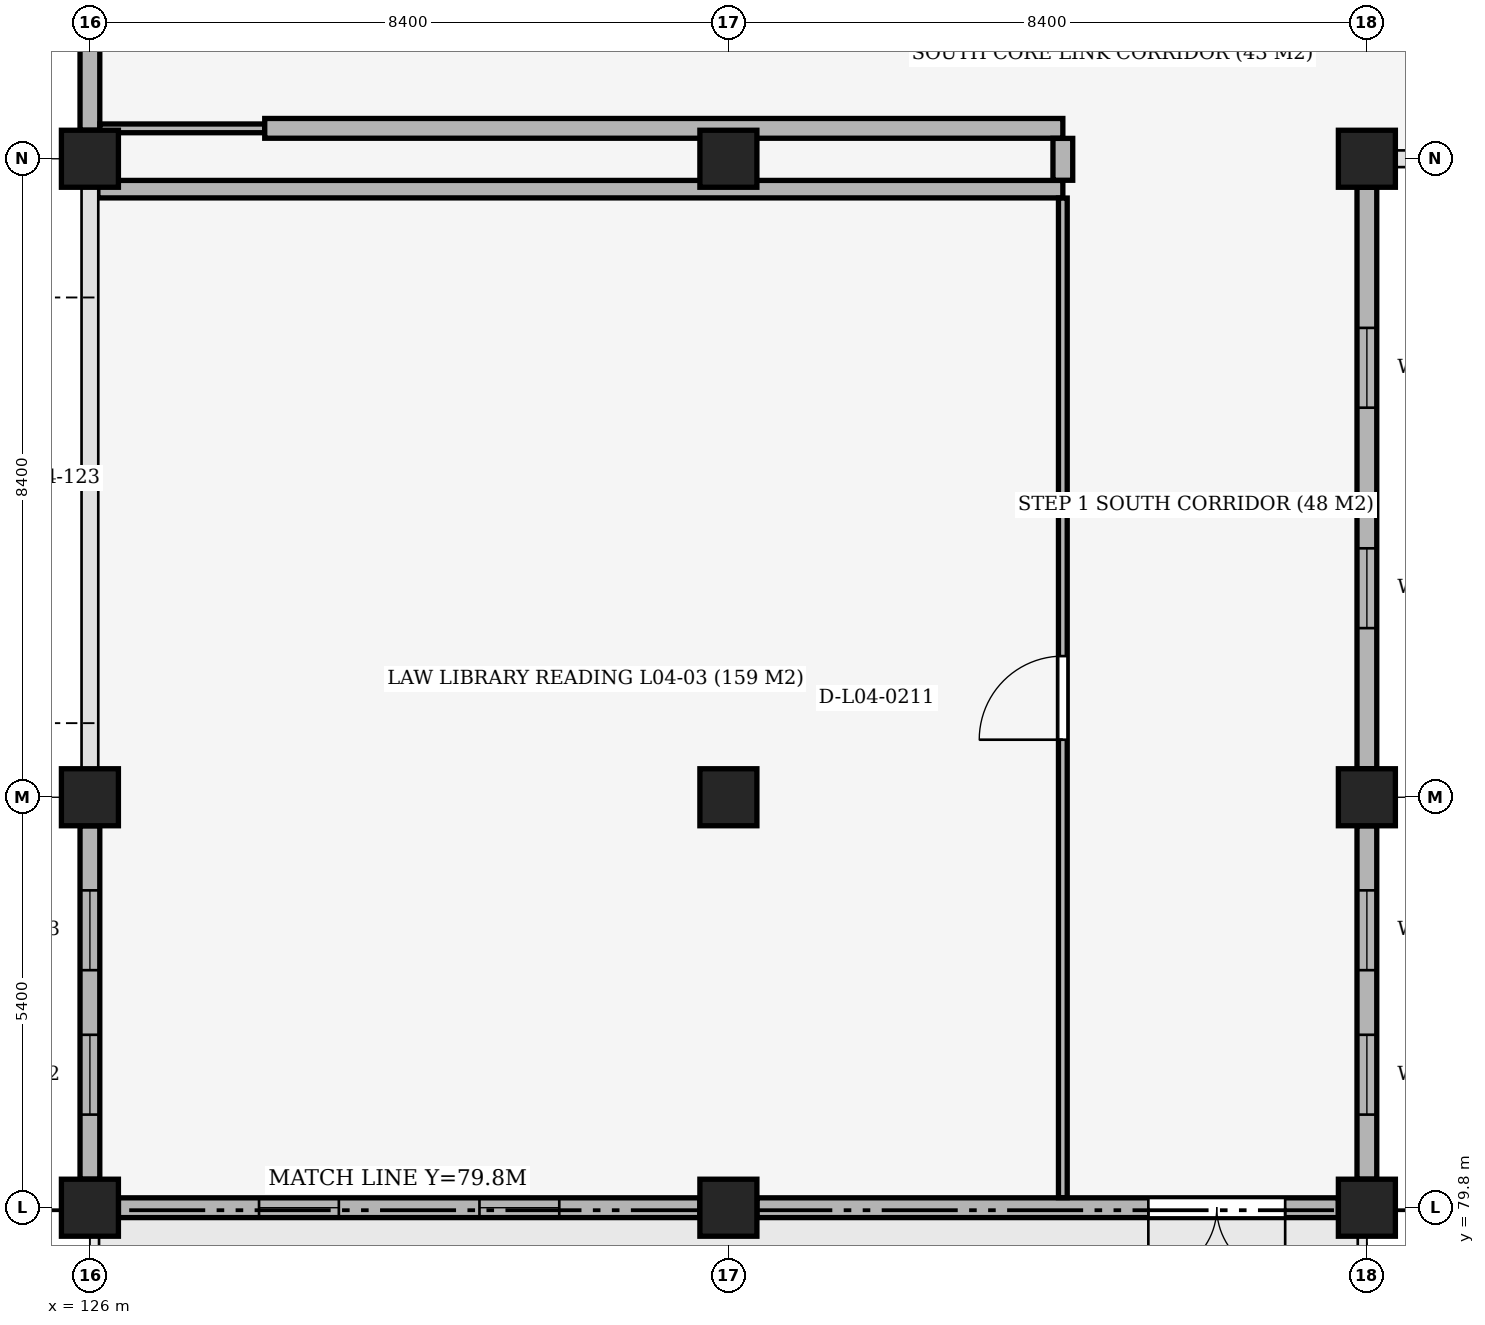
"""IFC4 building model, lengths in metres.
Left out: names, types, materials, properties, quantities, classifications, styles, units other than length and angle.
Written with IfcOpenShell. Run it as: python <this file> out.ifc"""

import sys

from ifc_helpers import new_model, si_unit, direction, frame, frame_2d, origin, origin_2d, place, context, subcontext, project, spatial, rectangle, extrude, element, fill, save


model = new_model("IFC4")
c1 = context("Model", 3, precision=1e-05, world=origin(), true_north=direction((0.0, 1.0)))
c2 = subcontext(c1, "Body", "Model", "MODEL_VIEW")
j1 = project(units=[si_unit("LENGTHUNIT", "METRE"), si_unit("PLANEANGLEUNIT", "RADIAN")], contexts=[c1])
p1 = place(None, origin())
s1 = spatial("IfcSite", under=j1, at=p1, CompositionType="ELEMENT")
p2 = place(p1, origin())
s2 = spatial("IfcBuilding", under=s1, at=p2, CompositionType="ELEMENT")
p3 = place(p2, frame((0.0, 0.0, 20.4)))
s3 = spatial("IfcBuildingStorey", under=s2, at=p3, CompositionType="ELEMENT", Elevation=20.4)
for number, where, z_axis, x_axis in (
    (1, (126.0, 79.8, 0.0), (0.0, 0.0, 1.0), (1.0, 0.0, 0.0)),
    (2, (126.0, 85.2, 0.0), (0.0, 0.0, 1.0), (1.0, 0.0, 0.0)),
    (3, (126.0, 93.6, 0.0), (0.0, 0.0, 1.0), (1.0, 0.0, 0.0)),
    (4, (134.4, 79.8, 0.0), (0.0, 0.0, 1.0), (1.0, 0.0, 0.0)),
    (5, (134.4, 85.2, 0.0), (0.0, 0.0, 1.0), (1.0, 0.0, 0.0)),
    (6, (134.4, 93.6, 0.0), (0.0, 0.0, 1.0), (1.0, 0.0, 0.0)),
    (7, (142.8, 79.8, 0.0), (0.0, 0.0, 1.0), (1.0, 0.0, 0.0)),
    (8, (142.8, 85.2, 0.0), (0.0, 0.0, 1.0), (1.0, 0.0, 0.0)),
    (9, (142.8, 93.6, 0.0), (0.0, 0.0, 1.0), (1.0, 0.0, 0.0)),
):
    element("IfcColumn", number, at=place(p3, frame(where, z_axis=z_axis, x_axis=x_axis)), inside=s3, PredefinedType="COLUMN", context=c2, shape_type="SweptSolid", body=[
        extrude(rectangle(XDim=0.75, YDim=0.75, at=origin_2d()), origin(), (0.0, 0.0, 1.0), 4.8),
    ])
p4 = place(p3, frame((126.0, 80.175, 0.0), z_axis=(0.0, 0.0, 1.0), x_axis=(0.0, 1.0, 0.0)))
e10 = element("IfcWall", 10, at=p4, inside=s3, PredefinedType="SOLIDWALL", context=c2, shape_type="SweptSolid", body=[
    extrude(rectangle(XDim=4.65, YDim=0.26, at=frame_2d((2.325, 0.0))), origin(), (0.0, 0.0, 1.0), 4.0),
])
p5 = place(p4, frame((0.85, 0.0, 1.05)))
e11 = element("IfcOpeningElement", 11, at=p5, cuts=e10, PredefinedType="OPENING", context=c2, shape_type="SweptSolid", body=[
    extrude(rectangle(XDim=1.05, YDim=1.8, at=frame_2d((0.525, 0.9))), frame((0.0, 0.145, 0.0), z_axis=(0.0, -1.0, 0.0), x_axis=(1.0, 0.0, 0.0)), (0.0, 0.0, 1.0), 0.29),
])
p6 = place(p4, frame((2.75, 0.0, 1.05)))
e12 = element("IfcOpeningElement", 12, at=p6, cuts=e10, PredefinedType="OPENING", context=c2, shape_type="SweptSolid", body=[
    extrude(rectangle(XDim=1.05, YDim=1.8, at=frame_2d((0.525, 0.9))), frame((0.0, 0.145, 0.0), z_axis=(0.0, -1.0, 0.0), x_axis=(1.0, 0.0, 0.0)), (0.0, 0.0, 1.0), 0.29),
])
p7 = place(p3, frame((126.0, 93.975, 0.0), z_axis=(0.0, 0.0, 1.0), x_axis=(0.0, 1.0, 0.0)))
e13 = element("IfcWall", 13, at=p7, inside=s3, PredefinedType="SOLIDWALL", context=c2, shape_type="SweptSolid", body=[
    extrude(rectangle(XDim=5.225, YDim=0.26, at=frame_2d((2.612, 0.0))), origin(), (0.0, 0.0, 1.0), 4.0),
])
p8 = place(p3, frame((142.8, 93.225, 0.0), z_axis=(0.0, 0.0, 1.0), x_axis=(0.0, -1.0, 0.0)))
e14 = element("IfcWall", 14, at=p8, inside=s3, PredefinedType="SOLIDWALL", context=c2, shape_type="SweptSolid", body=[
    extrude(rectangle(XDim=7.65, YDim=0.26, at=frame_2d((3.825, 0.0))), origin(), (0.0, 0.0, 1.0), 3.85),
])
p9 = place(p8, frame((1.85, 0.0, 1.05)))
e15 = element("IfcOpeningElement", 15, at=p9, cuts=e14, PredefinedType="OPENING", context=c2, shape_type="SweptSolid", body=[
    extrude(rectangle(XDim=1.05, YDim=1.8, at=frame_2d((0.525, 0.9))), frame((0.0, 0.145, 0.0), z_axis=(0.0, -1.0, 0.0), x_axis=(1.0, 0.0, 0.0)), (0.0, 0.0, 1.0), 0.29),
])
p10 = place(p8, frame((4.75, 0.0, 1.05)))
e16 = element("IfcOpeningElement", 16, at=p10, cuts=e14, PredefinedType="OPENING", context=c2, shape_type="SweptSolid", body=[
    extrude(rectangle(XDim=1.05, YDim=1.8, at=frame_2d((0.525, 0.9))), frame((0.0, 0.145, 0.0), z_axis=(0.0, -1.0, 0.0), x_axis=(1.0, 0.0, 0.0)), (0.0, 0.0, 1.0), 0.29),
])
p11 = place(p3, frame((142.8, 84.825, 0.0), z_axis=(0.0, 0.0, 1.0), x_axis=(0.0, -1.0, 0.0)))
e17 = element("IfcWall", 17, at=p11, inside=s3, PredefinedType="SOLIDWALL", context=c2, shape_type="SweptSolid", body=[
    extrude(rectangle(XDim=4.65, YDim=0.26, at=frame_2d((2.325, 0.0))), origin(), (0.0, 0.0, 1.0), 4.0),
])
p12 = place(p11, frame((0.85, 0.0, 1.05)))
e18 = element("IfcOpeningElement", 18, at=p12, cuts=e17, PredefinedType="OPENING", context=c2, shape_type="SweptSolid", body=[
    extrude(rectangle(XDim=1.05, YDim=1.8, at=frame_2d((0.525, 0.9))), frame((0.0, 0.145, 0.0), z_axis=(0.0, -1.0, 0.0), x_axis=(1.0, 0.0, 0.0)), (0.0, 0.0, 1.0), 0.29),
])
p13 = place(p11, frame((2.75, 0.0, 1.05)))
e19 = element("IfcOpeningElement", 19, at=p13, cuts=e17, PredefinedType="OPENING", context=c2, shape_type="SweptSolid", body=[
    extrude(rectangle(XDim=1.05, YDim=1.8, at=frame_2d((0.525, 0.9))), frame((0.0, 0.145, 0.0), z_axis=(0.0, -1.0, 0.0), x_axis=(1.0, 0.0, 0.0)), (0.0, 0.0, 1.0), 0.29),
])
p14 = place(p3, frame((142.425, 79.8, 0.0), z_axis=(0.0, 0.0, 1.0), x_axis=(-1.0, 0.0, 0.0)))
e20 = element("IfcWall", 20, at=p14, inside=s3, PredefinedType="SOLIDWALL", context=c2, shape_type="SweptSolid", body=[
    extrude(rectangle(XDim=7.65, YDim=0.26, at=frame_2d((3.825, 0.0))), origin(), (0.0, 0.0, 1.0), 3.85),
])
p15 = place(p14, frame((0.7, 0.0, 0.0)))
e21 = element("IfcOpeningElement", 21, at=p15, cuts=e20, PredefinedType="OPENING", context=c2, shape_type="SweptSolid", body=[
    extrude(rectangle(XDim=1.8, YDim=2.2, at=frame_2d((0.9, 1.1))), frame((0.0, 0.145, 0.0), z_axis=(0.0, -1.0, 0.0), x_axis=(1.0, 0.0, 0.0)), (0.0, 0.0, 1.0), 0.29),
])
p16 = place(p3, frame((134.025, 79.8, 0.0), z_axis=(0.0, 0.0, 1.0), x_axis=(-1.0, 0.0, 0.0)))
e22 = element("IfcWall", 22, at=p16, inside=s3, PredefinedType="SOLIDWALL", context=c2, shape_type="SweptSolid", body=[
    extrude(rectangle(XDim=7.65, YDim=0.26, at=frame_2d((3.825, 0.0))), origin(), (0.0, 0.0, 1.0), 3.85),
])
p17 = place(p16, frame((1.85, 0.0, 1.05)))
e23 = element("IfcOpeningElement", 23, at=p17, cuts=e22, PredefinedType="OPENING", context=c2, shape_type="SweptSolid", body=[
    extrude(rectangle(XDim=1.05, YDim=1.8, at=frame_2d((0.525, 0.9))), frame((0.0, 0.145, 0.0), z_axis=(0.0, -1.0, 0.0), x_axis=(1.0, 0.0, 0.0)), (0.0, 0.0, 1.0), 0.29),
])
p18 = place(p16, frame((4.75, 0.0, 1.05)))
e24 = element("IfcOpeningElement", 24, at=p18, cuts=e22, PredefinedType="OPENING", context=c2, shape_type="SweptSolid", body=[
    extrude(rectangle(XDim=1.05, YDim=1.8, at=frame_2d((0.525, 0.9))), frame((0.0, 0.145, 0.0), z_axis=(0.0, -1.0, 0.0), x_axis=(1.0, 0.0, 0.0)), (0.0, 0.0, 1.0), 0.29),
])
p19 = place(p3, frame((126.105, 93.2, 0.0), z_axis=(0.0, 0.0, 1.0), x_axis=(1.0, 0.0, 0.0)))
e25 = element("IfcWall", 25, at=p19, inside=s3, PredefinedType="SOLIDWALL", context=c2, shape_type="SweptSolid", body=[
    extrude(rectangle(XDim=12.695, YDim=0.23, at=frame_2d((6.348, 0.0))), origin(), (0.0, 0.0, 1.0), 3.85),
])
p20 = place(p3, frame((126.132, 94.0, 0.0), z_axis=(0.0, 0.0, 1.0), x_axis=(1.0, 0.0, 0.0)))
e26 = element("IfcWall", 26, at=p20, inside=s3, PredefinedType="PARTITIONING", context=c2, shape_type="SweptSolid", body=[
    extrude(rectangle(XDim=2.168, YDim=0.115, at=frame_2d((1.084, 0.0))), origin(), (0.0, 0.0, 1.0), 4.0),
])
p21 = place(p3, frame((128.3, 94.0, 0.0), z_axis=(0.0, 0.0, 1.0), x_axis=(1.0, 0.0, 0.0)))
e27 = element("IfcWall", 27, at=p21, inside=s3, PredefinedType="PARTITIONING", context=c2, shape_type="SweptSolid", body=[
    extrude(rectangle(XDim=10.5, YDim=0.26, at=frame_2d((5.25, 0.0))), origin(), (0.0, 0.0, 1.0), 4.0),
])
p22 = place(p3, frame((138.8, 79.932, 0.0), z_axis=(0.0, 0.0, 1.0), x_axis=(0.0, 1.0, 0.0)))
e28 = element("IfcWall", 28, at=p22, inside=s3, PredefinedType="PARTITIONING", context=c2, shape_type="SweptSolid", body=[
    extrude(rectangle(XDim=13.151, YDim=0.115, at=frame_2d((6.576, 0.0))), origin(), (0.0, 0.0, 1.0), 3.85),
])
p23 = place(p22, frame((6.025, 0.0, 0.0)))
e29 = element("IfcOpeningElement", 29, at=p23, cuts=e28, PredefinedType="OPENING", context=c2, shape_type="SweptSolid", body=[
    extrude(rectangle(XDim=1.1, YDim=2.1, at=frame_2d((0.55, 1.05))), frame((0.0, 0.072, 0.0), z_axis=(0.0, -1.0, 0.0), x_axis=(1.0, 0.0, 0.0)), (0.0, 0.0, 1.0), 0.145),
])
p24 = place(p3, frame((138.8, 93.317, 0.0), z_axis=(0.0, 0.0, 1.0), x_axis=(0.0, 1.0, 0.0)))
e30 = element("IfcWall", 30, at=p24, inside=s3, PredefinedType="PARTITIONING", context=c2, shape_type="SweptSolid", body=[
    extrude(rectangle(XDim=0.551, YDim=0.26, at=frame_2d((0.275, 0.0))), origin(), (0.0, 0.0, 1.0), 3.85),
])
p25 = place(p5, origin())
e31 = element("IfcWindow", 31, at=p25, inside=s3, PartitioningType="SINGLE_PANEL", PredefinedType="WINDOW", context=c2, shape_type="SweptSolid", body=[
    extrude(rectangle(XDim=1.05, YDim=1.8, at=frame_2d((0.525, 0.9))), frame((0.0, 0.03, 0.0), z_axis=(0.0, -1.0, 0.0), x_axis=(1.0, 0.0, 0.0)), (0.0, 0.0, 1.0), 0.06),
])
fill(e11, e31)
p26 = place(p6, origin())
e32 = element("IfcWindow", 32, at=p26, inside=s3, PartitioningType="SINGLE_PANEL", PredefinedType="WINDOW", context=c2, shape_type="SweptSolid", body=[
    extrude(rectangle(XDim=1.05, YDim=1.8, at=frame_2d((0.525, 0.9))), frame((0.0, 0.03, 0.0), z_axis=(0.0, -1.0, 0.0), x_axis=(1.0, 0.0, 0.0)), (0.0, 0.0, 1.0), 0.06),
])
fill(e12, e32)
p27 = place(p9, origin())
e33 = element("IfcWindow", 33, at=p27, inside=s3, PartitioningType="SINGLE_PANEL", PredefinedType="WINDOW", context=c2, shape_type="SweptSolid", body=[
    extrude(rectangle(XDim=1.05, YDim=1.8, at=frame_2d((0.525, 0.9))), frame((0.0, 0.03, 0.0), z_axis=(0.0, -1.0, 0.0), x_axis=(1.0, 0.0, 0.0)), (0.0, 0.0, 1.0), 0.06),
])
fill(e15, e33)
p28 = place(p10, origin())
e34 = element("IfcWindow", 34, at=p28, inside=s3, PartitioningType="SINGLE_PANEL", PredefinedType="WINDOW", context=c2, shape_type="SweptSolid", body=[
    extrude(rectangle(XDim=1.05, YDim=1.8, at=frame_2d((0.525, 0.9))), frame((0.0, 0.03, 0.0), z_axis=(0.0, -1.0, 0.0), x_axis=(1.0, 0.0, 0.0)), (0.0, 0.0, 1.0), 0.06),
])
fill(e16, e34)
p29 = place(p12, origin())
e35 = element("IfcWindow", 35, at=p29, inside=s3, PartitioningType="SINGLE_PANEL", PredefinedType="WINDOW", context=c2, shape_type="SweptSolid", body=[
    extrude(rectangle(XDim=1.05, YDim=1.8, at=frame_2d((0.525, 0.9))), frame((0.0, 0.03, 0.0), z_axis=(0.0, -1.0, 0.0), x_axis=(1.0, 0.0, 0.0)), (0.0, 0.0, 1.0), 0.06),
])
fill(e18, e35)
p30 = place(p13, origin())
e36 = element("IfcWindow", 36, at=p30, inside=s3, PartitioningType="SINGLE_PANEL", PredefinedType="WINDOW", context=c2, shape_type="SweptSolid", body=[
    extrude(rectangle(XDim=1.05, YDim=1.8, at=frame_2d((0.525, 0.9))), frame((0.0, 0.03, 0.0), z_axis=(0.0, -1.0, 0.0), x_axis=(1.0, 0.0, 0.0)), (0.0, 0.0, 1.0), 0.06),
])
fill(e19, e36)
p31 = place(p15, origin())
e37 = element("IfcDoor", 37, at=p31, inside=s3, OperationType="DOUBLE_DOOR_SINGLE_SWING", PredefinedType="DOOR", context=c2, shape_type="SweptSolid", body=[
    extrude(rectangle(XDim=1.8, YDim=2.2, at=frame_2d((0.9, 1.1))), frame((0.0, 0.025, 0.0), z_axis=(0.0, -1.0, 0.0), x_axis=(1.0, 0.0, 0.0)), (0.0, 0.0, 1.0), 0.05),
])
fill(e21, e37)
p32 = place(p17, origin())
e38 = element("IfcWindow", 38, at=p32, inside=s3, PartitioningType="SINGLE_PANEL", PredefinedType="WINDOW", context=c2, shape_type="SweptSolid", body=[
    extrude(rectangle(XDim=1.05, YDim=1.8, at=frame_2d((0.525, 0.9))), frame((0.0, 0.03, 0.0), z_axis=(0.0, -1.0, 0.0), x_axis=(1.0, 0.0, 0.0)), (0.0, 0.0, 1.0), 0.06),
])
fill(e23, e38)
p33 = place(p18, origin())
e39 = element("IfcWindow", 39, at=p33, inside=s3, PartitioningType="SINGLE_PANEL", PredefinedType="WINDOW", context=c2, shape_type="SweptSolid", body=[
    extrude(rectangle(XDim=1.05, YDim=1.8, at=frame_2d((0.525, 0.9))), frame((0.0, 0.03, 0.0), z_axis=(0.0, -1.0, 0.0), x_axis=(1.0, 0.0, 0.0)), (0.0, 0.0, 1.0), 0.06),
])
fill(e24, e39)
p34 = place(p23, origin())
e40 = element("IfcDoor", 40, at=p34, inside=s3, OperationType="SINGLE_SWING_LEFT", PredefinedType="DOOR", context=c2, shape_type="SweptSolid", body=[
    extrude(rectangle(XDim=1.1, YDim=2.1, at=frame_2d((0.55, 1.05))), frame((0.0, 0.025, 0.0), z_axis=(0.0, -1.0, 0.0), x_axis=(1.0, 0.0, 0.0)), (0.0, 0.0, 1.0), 0.05),
])
fill(e29, e40)
save(model, sys.argv[1])
